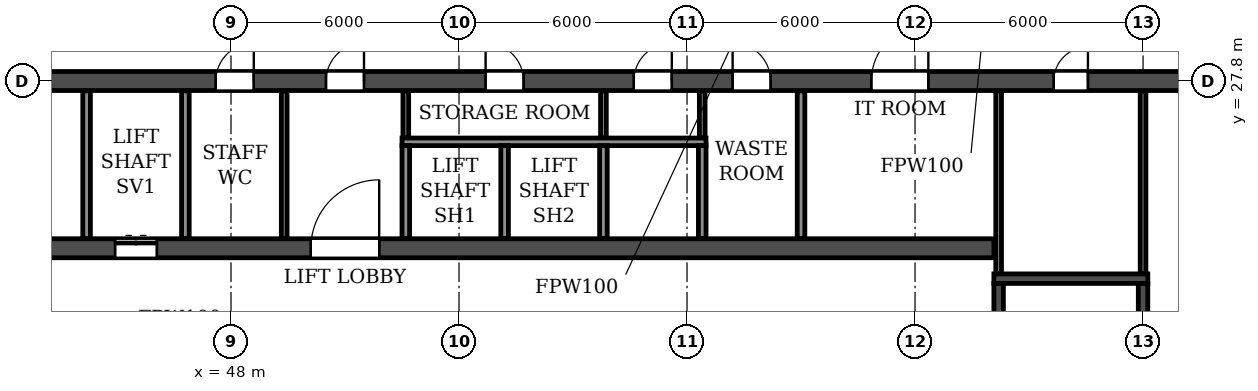
"""IFC4 building model, lengths in metres.
Left out: names, types, materials, properties, quantities, classifications, styles, units other than length and angle.
Written with IfcOpenShell. Run it as: python <this file> out.ifc"""

import sys

from ifc_helpers import new_model, si_unit, direction, frame, frame_2d, origin, place, context, subcontext, project, spatial, rectangle, extrude, element, fill, save


model = new_model("IFC4")
c1 = context("Model", 3, precision=1e-05, world=origin(), true_north=direction((0.0, 1.0)))
c2 = subcontext(c1, "Body", "Model", "MODEL_VIEW")
j1 = project(units=[si_unit("LENGTHUNIT", "METRE"), si_unit("PLANEANGLEUNIT", "RADIAN")], contexts=[c1])
p1 = place(None, origin())
s1 = spatial("IfcSite", under=j1, at=p1, CompositionType="ELEMENT")
p2 = place(p1, origin())
s2 = spatial("IfcBuilding", under=s1, at=p2, CompositionType="ELEMENT")
p3 = place(p2, frame((0.0, 0.0, 92.7)))
s3 = spatial("IfcBuildingStorey", under=s2, at=p3, CompositionType="ELEMENT", Elevation=92.7)
p4 = place(p3, frame((8.6, 27.8, 0.0), z_axis=(0.0, 0.0, 1.0), x_axis=(1.0, 0.0, 0.0)))
e1 = element("IfcWall", 1, at=p4, inside=s3, PredefinedType="SOLIDWALL", context=c2, shape_type="SweptSolid", body=[
    extrude(rectangle(XDim=84.8, YDim=0.5, at=frame_2d((42.4, 0.0))), origin(), (0.0, 0.0, 1.0), 3.06),
])
p5 = place(p4, frame((0.9, 0.0, 0.0)))
e2 = element("IfcOpeningElement", 2, at=p5, cuts=e1, PredefinedType="OPENING", context=c2, shape_type="SweptSolid", body=[
    extrude(rectangle(XDim=1.0, YDim=2.1, at=frame_2d((0.5, 1.05))), frame((0.0, 0.26, 0.0), z_axis=(0.0, -1.0, 0.0), x_axis=(1.0, 0.0, 0.0)), (0.0, 0.0, 1.0), 0.52),
])
p6 = place(p4, frame((5.6, 0.0, 0.0)))
e3 = element("IfcOpeningElement", 3, at=p6, cuts=e1, PredefinedType="OPENING", context=c2, shape_type="SweptSolid", body=[
    extrude(rectangle(XDim=1.0, YDim=2.1, at=frame_2d((0.5, 1.05))), frame((0.0, 0.26, 0.0), z_axis=(0.0, -1.0, 0.0), x_axis=(1.0, 0.0, 0.0)), (0.0, 0.0, 1.0), 0.52),
])
p7 = place(p4, frame((10.3, 0.0, 0.0)))
e4 = element("IfcOpeningElement", 4, at=p7, cuts=e1, PredefinedType="OPENING", context=c2, shape_type="SweptSolid", body=[
    extrude(rectangle(XDim=1.0, YDim=2.1, at=frame_2d((0.5, 1.05))), frame((0.0, 0.26, 0.0), z_axis=(0.0, -1.0, 0.0), x_axis=(1.0, 0.0, 0.0)), (0.0, 0.0, 1.0), 0.52),
])
p8 = place(p4, frame((13.65, 0.0, 0.0)))
e5 = element("IfcOpeningElement", 5, at=p8, cuts=e1, PredefinedType="OPENING", context=c2, shape_type="SweptSolid", body=[
    extrude(rectangle(XDim=0.9, YDim=2.1, at=frame_2d((0.45, 1.05))), frame((0.0, 0.26, 0.0), z_axis=(0.0, -1.0, 0.0), x_axis=(1.0, 0.0, 0.0)), (0.0, 0.0, 1.0), 0.52),
])
p9 = place(p4, frame((22.85, 0.0, 0.0)))
e6 = element("IfcOpeningElement", 6, at=p9, cuts=e1, PredefinedType="OPENING", context=c2, shape_type="SweptSolid", body=[
    extrude(rectangle(XDim=0.9, YDim=2.1, at=frame_2d((0.45, 1.05))), frame((0.0, 0.26, 0.0), z_axis=(0.0, -1.0, 0.0), x_axis=(1.0, 0.0, 0.0)), (0.0, 0.0, 1.0), 0.52),
])
p10 = place(p4, frame((26.0, 0.0, 0.0)))
e7 = element("IfcOpeningElement", 7, at=p10, cuts=e1, PredefinedType="OPENING", context=c2, shape_type="SweptSolid", body=[
    extrude(rectangle(XDim=1.0, YDim=2.1, at=frame_2d((0.5, 1.05))), frame((0.0, 0.26, 0.0), z_axis=(0.0, -1.0, 0.0), x_axis=(1.0, 0.0, 0.0)), (0.0, 0.0, 1.0), 0.52),
])
p11 = place(p4, frame((31.2, 0.0, 0.0)))
e8 = element("IfcOpeningElement", 8, at=p11, cuts=e1, PredefinedType="OPENING", context=c2, shape_type="SweptSolid", body=[
    extrude(rectangle(XDim=1.0, YDim=2.1, at=frame_2d((0.5, 1.05))), frame((0.0, 0.26, 0.0), z_axis=(0.0, -1.0, 0.0), x_axis=(1.0, 0.0, 0.0)), (0.0, 0.0, 1.0), 0.52),
])
p12 = place(p4, frame((39.0, 0.0, 0.0)))
e9 = element("IfcOpeningElement", 9, at=p12, cuts=e1, PredefinedType="OPENING", context=c2, shape_type="SweptSolid", body=[
    extrude(rectangle(XDim=1.0, YDim=2.1, at=frame_2d((0.5, 1.05))), frame((0.0, 0.26, 0.0), z_axis=(0.0, -1.0, 0.0), x_axis=(1.0, 0.0, 0.0)), (0.0, 0.0, 1.0), 0.52),
])
p13 = place(p4, frame((41.9, 0.0, 0.0)))
e10 = element("IfcOpeningElement", 10, at=p13, cuts=e1, PredefinedType="OPENING", context=c2, shape_type="SweptSolid", body=[
    extrude(rectangle(XDim=1.0, YDim=2.1, at=frame_2d((0.5, 1.05))), frame((0.0, 0.26, 0.0), z_axis=(0.0, -1.0, 0.0), x_axis=(1.0, 0.0, 0.0)), (0.0, 0.0, 1.0), 0.52),
])
p14 = place(p4, frame((46.1, 0.0, 0.0)))
e11 = element("IfcOpeningElement", 11, at=p14, cuts=e1, PredefinedType="OPENING", context=c2, shape_type="SweptSolid", body=[
    extrude(rectangle(XDim=1.0, YDim=2.1, at=frame_2d((0.5, 1.05))), frame((0.0, 0.26, 0.0), z_axis=(0.0, -1.0, 0.0), x_axis=(1.0, 0.0, 0.0)), (0.0, 0.0, 1.0), 0.52),
])
p15 = place(p4, frame((50.0, 0.0, 0.0)))
e12 = element("IfcOpeningElement", 12, at=p15, cuts=e1, PredefinedType="OPENING", context=c2, shape_type="SweptSolid", body=[
    extrude(rectangle(XDim=1.0, YDim=2.1, at=frame_2d((0.5, 1.05))), frame((0.0, 0.26, 0.0), z_axis=(0.0, -1.0, 0.0), x_axis=(1.0, 0.0, 0.0)), (0.0, 0.0, 1.0), 0.52),
])
p16 = place(p4, frame((52.6, 0.0, 0.0)))
e13 = element("IfcOpeningElement", 13, at=p16, cuts=e1, PredefinedType="OPENING", context=c2, shape_type="SweptSolid", body=[
    extrude(rectangle(XDim=1.0, YDim=2.1, at=frame_2d((0.5, 1.05))), frame((0.0, 0.26, 0.0), z_axis=(0.0, -1.0, 0.0), x_axis=(1.0, 0.0, 0.0)), (0.0, 0.0, 1.0), 0.52),
])
p17 = place(p4, frame((56.25, 0.0, 0.0)))
e14 = element("IfcOpeningElement", 14, at=p17, cuts=e1, PredefinedType="OPENING", context=c2, shape_type="SweptSolid", body=[
    extrude(rectangle(XDim=1.5, YDim=2.1, at=frame_2d((0.75, 1.05))), frame((0.0, 0.26, 0.0), z_axis=(0.0, -1.0, 0.0), x_axis=(1.0, 0.0, 0.0)), (0.0, 0.0, 1.0), 0.52),
])
p18 = place(p4, frame((61.05, 0.0, 0.0)))
e15 = element("IfcOpeningElement", 15, at=p18, cuts=e1, PredefinedType="OPENING", context=c2, shape_type="SweptSolid", body=[
    extrude(rectangle(XDim=0.9, YDim=2.1, at=frame_2d((0.45, 1.05))), frame((0.0, 0.26, 0.0), z_axis=(0.0, -1.0, 0.0), x_axis=(1.0, 0.0, 0.0)), (0.0, 0.0, 1.0), 0.52),
])
p19 = place(p4, frame((70.25, 0.0, 0.0)))
e16 = element("IfcOpeningElement", 16, at=p19, cuts=e1, PredefinedType="OPENING", context=c2, shape_type="SweptSolid", body=[
    extrude(rectangle(XDim=0.9, YDim=2.1, at=frame_2d((0.45, 1.05))), frame((0.0, 0.26, 0.0), z_axis=(0.0, -1.0, 0.0), x_axis=(1.0, 0.0, 0.0)), (0.0, 0.0, 1.0), 0.52),
])
p20 = place(p4, frame((73.5, 0.0, 0.0)))
e17 = element("IfcOpeningElement", 17, at=p20, cuts=e1, PredefinedType="OPENING", context=c2, shape_type="SweptSolid", body=[
    extrude(rectangle(XDim=1.0, YDim=2.1, at=frame_2d((0.5, 1.05))), frame((0.0, 0.26, 0.0), z_axis=(0.0, -1.0, 0.0), x_axis=(1.0, 0.0, 0.0)), (0.0, 0.0, 1.0), 0.52),
])
p21 = place(p4, frame((79.6, 0.0, 0.0)))
e18 = element("IfcOpeningElement", 18, at=p21, cuts=e1, PredefinedType="OPENING", context=c2, shape_type="SweptSolid", body=[
    extrude(rectangle(XDim=1.0, YDim=2.1, at=frame_2d((0.5, 1.05))), frame((0.0, 0.26, 0.0), z_axis=(0.0, -1.0, 0.0), x_axis=(1.0, 0.0, 0.0)), (0.0, 0.0, 1.0), 0.52),
])
p22 = place(p3, frame((33.925, 23.4, 0.0), z_axis=(0.0, 0.0, 1.0), x_axis=(1.0, 0.0, 0.0)))
e19 = element("IfcWall", 19, at=p22, inside=s3, PredefinedType="SOLIDWALL", context=c2, shape_type="SweptSolid", body=[
    extrude(rectangle(XDim=34.15, YDim=0.5, at=frame_2d((17.075, 0.0))), origin(), (0.0, 0.0, 1.0), 3.06),
])
p23 = place(p22, frame((16.175, 0.0, 0.0)))
e20 = element("IfcOpeningElement", 20, at=p23, cuts=e19, PredefinedType="OPENING", context=c2, shape_type="SweptSolid", body=[
    extrude(rectangle(XDim=1.8, YDim=2.1, at=frame_2d((0.9, 1.05))), frame((0.0, 0.26, 0.0), z_axis=(0.0, -1.0, 0.0), x_axis=(1.0, 0.0, 0.0)), (0.0, 0.0, 1.0), 0.52),
])
p24 = place(p22, frame((11.025, 0.0, 0.0)))
e21 = element("IfcOpeningElement", 21, at=p24, cuts=e19, PredefinedType="OPENING", context=c2, shape_type="SweptSolid", body=[
    extrude(rectangle(XDim=1.1, YDim=2.1, at=frame_2d((0.55, 1.05))), frame((0.0, 0.26, 0.0), z_axis=(0.0, -1.0, 0.0), x_axis=(1.0, 0.0, 0.0)), (0.0, 0.0, 1.0), 0.52),
])
p25 = place(p3, frame((68.2, 14.85, 0.0), z_axis=(0.0, 0.0, 1.0), x_axis=(0.0, 1.0, 0.0)))
e22 = element("IfcWall", 22, at=p25, inside=s3, PredefinedType="SOLIDWALL", context=c2, shape_type="SweptSolid", body=[
    extrude(rectangle(XDim=7.625, YDim=0.25, at=frame_2d((3.812, 0.0))), origin(), (0.0, 0.0, 1.0), 3.06),
])
p26 = place(p25, frame((0.45, 0.0, 0.0)))
e23 = element("IfcOpeningElement", 23, at=p26, cuts=e22, PredefinedType="OPENING", context=c2, shape_type="SweptSolid", body=[
    extrude(rectangle(XDim=1.0, YDim=2.1, at=frame_2d((0.5, 1.05))), frame((0.0, 0.135, 0.0), z_axis=(0.0, -1.0, 0.0), x_axis=(1.0, 0.0, 0.0)), (0.0, 0.0, 1.0), 0.27),
])
p27 = place(p3, frame((72.0, 14.85, 0.0), z_axis=(0.0, 0.0, 1.0), x_axis=(0.0, 1.0, 0.0)))
e24 = element("IfcWall", 24, at=p27, inside=s3, PredefinedType="SOLIDWALL", context=c2, shape_type="SweptSolid", body=[
    extrude(rectangle(XDim=7.625, YDim=0.25, at=frame_2d((3.812, 0.0))), origin(), (0.0, 0.0, 1.0), 3.06),
])
p28 = place(p3, frame((68.075, 22.6, 0.0), z_axis=(0.0, 0.0, 1.0), x_axis=(1.0, 0.0, 0.0)))
e25 = element("IfcWall", 25, at=p28, inside=s3, PredefinedType="SOLIDWALL", context=c2, shape_type="SweptSolid", body=[
    extrude(rectangle(XDim=4.05, YDim=0.25, at=frame_2d((2.025, 0.0))), origin(), (0.0, 0.0, 1.0), 3.06),
])
p29 = place(p3, frame((49.4, 23.66, 0.0), z_axis=(0.0, 0.0, 1.0), x_axis=(0.0, 1.0, 0.0)))
e26 = element("IfcWall", 26, at=p29, inside=s3, PredefinedType="PARTITIONING", context=c2, shape_type="SweptSolid", body=[
    extrude(rectangle(XDim=3.88, YDim=0.15, at=frame_2d((1.94, 0.0))), origin(), (0.0, 0.0, 1.0), 3.06),
])
for number, where, z_axis, x_axis in (
    (27, (52.6, 26.3, 0.0), (0.0, 0.0, 1.0), (0.0, 1.0, 0.0)),
    (28, (57.8, 26.3, 0.0), (0.0, 0.0, 1.0), (0.0, 1.0, 0.0)),
    (29, (60.4, 26.3, 0.0), (0.0, 0.0, 1.0), (0.0, 1.0, 0.0)),
):
    element("IfcWall", number, at=place(p3, frame(where, z_axis=z_axis, x_axis=x_axis)), inside=s3, PredefinedType="PARTITIONING", context=c2, shape_type="SweptSolid", body=[
        extrude(rectangle(XDim=1.24, YDim=0.15, at=frame_2d((0.62, 0.0))), origin(), (0.0, 0.0, 1.0), 3.06),
    ])
p30 = place(p3, frame((63.0, 23.66, 0.0), z_axis=(0.0, 0.0, 1.0), x_axis=(0.0, 1.0, 0.0)))
e30 = element("IfcWall", 30, at=p30, inside=s3, PredefinedType="PARTITIONING", context=c2, shape_type="SweptSolid", body=[
    extrude(rectangle(XDim=3.88, YDim=0.2, at=frame_2d((1.94, 0.0))), origin(), (0.0, 0.0, 1.0), 3.06),
])
for number, where, z_axis, x_axis in (
    (31, (68.2, 22.735, 0.0), (0.0, 0.0, 1.0), (0.0, 1.0, 0.0)),
    (32, (72.0, 22.735, 0.0), (0.0, 0.0, 1.0), (0.0, 1.0, 0.0)),
):
    element("IfcWall", number, at=place(p3, frame(where, z_axis=z_axis, x_axis=x_axis)), inside=s3, PredefinedType="PARTITIONING", context=c2, shape_type="SweptSolid", body=[
        extrude(rectangle(XDim=4.805, YDim=0.15, at=frame_2d((2.402, 0.0))), origin(), (0.0, 0.0, 1.0), 3.06),
    ])
p31 = place(p3, frame((52.5, 26.2, 0.0), z_axis=(0.0, 0.0, 1.0), x_axis=(1.0, 0.0, 0.0)))
e33 = element("IfcWall", 33, at=p31, inside=s3, PredefinedType="PARTITIONING", context=c2, shape_type="SweptSolid", body=[
    extrude(rectangle(XDim=8.0, YDim=0.2, at=frame_2d((4.0, 0.0))), origin(), (0.0, 0.0, 1.0), 3.06),
])
for number, where, z_axis, x_axis in (
    (34, (44.2, 23.66, 0.0), (0.0, 0.0, 1.0), (0.0, 1.0, 0.0)),
    (35, (46.8, 23.66, 0.0), (0.0, 0.0, 1.0), (0.0, 1.0, 0.0)),
):
    element("IfcWall", number, at=place(p3, frame(where, z_axis=z_axis, x_axis=x_axis)), inside=s3, PredefinedType="PARTITIONING", context=c2, shape_type="SweptSolid", body=[
        extrude(rectangle(XDim=3.88, YDim=0.2, at=frame_2d((1.94, 0.0))), origin(), (0.0, 0.0, 1.0), 3.06),
    ])
for number, where, z_axis, x_axis in (
    (36, (52.6, 23.66, 0.0), (0.0, 0.0, 1.0), (0.0, 1.0, 0.0)),
    (37, (55.2, 23.66, 0.0), (0.0, 0.0, 1.0), (0.0, 1.0, 0.0)),
    (38, (57.8, 23.66, 0.0), (0.0, 0.0, 1.0), (0.0, 1.0, 0.0)),
    (39, (60.4, 23.66, 0.0), (0.0, 0.0, 1.0), (0.0, 1.0, 0.0)),
):
    element("IfcWall", number, at=place(p3, frame(where, z_axis=z_axis, x_axis=x_axis)), inside=s3, PredefinedType="PARTITIONING", context=c2, shape_type="SweptSolid", body=[
        extrude(rectangle(XDim=2.44, YDim=0.2, at=frame_2d((1.22, 0.0))), origin(), (0.0, 0.0, 1.0), 3.06),
    ])
p32 = place(p12, origin())
e40 = element("IfcDoor", 40, at=p32, inside=s3, OperationType="SINGLE_SWING_RIGHT", PredefinedType="DOOR", context=c2, shape_type="SweptSolid", body=[
    extrude(rectangle(XDim=1.0, YDim=2.1, at=frame_2d((0.5, 1.05))), frame((0.0, 0.025, 0.0), z_axis=(0.0, -1.0, 0.0), x_axis=(1.0, 0.0, 0.0)), (0.0, 0.0, 1.0), 0.05),
])
fill(e9, e40)
p33 = place(p13, origin())
e41 = element("IfcDoor", 41, at=p33, inside=s3, OperationType="SINGLE_SWING_RIGHT", PredefinedType="DOOR", context=c2, shape_type="SweptSolid", body=[
    extrude(rectangle(XDim=1.0, YDim=2.1, at=frame_2d((0.5, 1.05))), frame((0.0, 0.025, 0.0), z_axis=(0.0, -1.0, 0.0), x_axis=(1.0, 0.0, 0.0)), (0.0, 0.0, 1.0), 0.05),
])
fill(e10, e41)
p34 = place(p14, origin())
e42 = element("IfcDoor", 42, at=p34, inside=s3, OperationType="SINGLE_SWING_LEFT", PredefinedType="DOOR", context=c2, shape_type="SweptSolid", body=[
    extrude(rectangle(XDim=1.0, YDim=2.1, at=frame_2d((0.5, 1.05))), frame((0.0, 0.025, 0.0), z_axis=(0.0, -1.0, 0.0), x_axis=(1.0, 0.0, 0.0)), (0.0, 0.0, 1.0), 0.05),
])
fill(e11, e42)
p35 = place(p15, origin())
e43 = element("IfcDoor", 43, at=p35, inside=s3, OperationType="SINGLE_SWING_RIGHT", PredefinedType="DOOR", context=c2, shape_type="SweptSolid", body=[
    extrude(rectangle(XDim=1.0, YDim=2.1, at=frame_2d((0.5, 1.05))), frame((0.0, 0.025, 0.0), z_axis=(0.0, -1.0, 0.0), x_axis=(1.0, 0.0, 0.0)), (0.0, 0.0, 1.0), 0.05),
])
fill(e12, e43)
p36 = place(p16, origin())
e44 = element("IfcDoor", 44, at=p36, inside=s3, OperationType="SINGLE_SWING_LEFT", PredefinedType="DOOR", context=c2, shape_type="SweptSolid", body=[
    extrude(rectangle(XDim=1.0, YDim=2.1, at=frame_2d((0.5, 1.05))), frame((0.0, 0.025, 0.0), z_axis=(0.0, -1.0, 0.0), x_axis=(1.0, 0.0, 0.0)), (0.0, 0.0, 1.0), 0.05),
])
fill(e13, e44)
p37 = place(p17, origin())
e45 = element("IfcDoor", 45, at=p37, inside=s3, OperationType="DOUBLE_DOOR_SINGLE_SWING", PredefinedType="DOOR", context=c2, shape_type="SweptSolid", body=[
    extrude(rectangle(XDim=1.5, YDim=2.1, at=frame_2d((0.75, 1.05))), frame((0.0, 0.025, 0.0), z_axis=(0.0, -1.0, 0.0), x_axis=(1.0, 0.0, 0.0)), (0.0, 0.0, 1.0), 0.05),
])
fill(e14, e45)
p38 = place(p18, origin())
e46 = element("IfcDoor", 46, at=p38, inside=s3, OperationType="SINGLE_SWING_RIGHT", PredefinedType="DOOR", context=c2, shape_type="SweptSolid", body=[
    extrude(rectangle(XDim=0.9, YDim=2.1, at=frame_2d((0.45, 1.05))), frame((0.0, 0.025, 0.0), z_axis=(0.0, -1.0, 0.0), x_axis=(1.0, 0.0, 0.0)), (0.0, 0.0, 1.0), 0.05),
])
fill(e15, e46)
p39 = place(p23, origin())
e47 = element("IfcDoor", 47, at=p39, inside=s3, OperationType="DOUBLE_DOOR_SINGLE_SWING", PredefinedType="DOOR", context=c2, shape_type="SweptSolid", body=[
    extrude(rectangle(XDim=1.8, YDim=2.1, at=frame_2d((0.9, 1.05))), frame((0.0, 0.025, 0.0), z_axis=(0.0, -1.0, 0.0), x_axis=(1.0, 0.0, 0.0)), (0.0, 0.0, 1.0), 0.05),
])
fill(e20, e47)
p40 = place(p24, origin())
e48 = element("IfcDoor", 48, at=p40, inside=s3, OperationType="DOUBLE_DOOR_SLIDING", PredefinedType="DOOR", context=c2, shape_type="SweptSolid", body=[
    extrude(rectangle(XDim=1.1, YDim=2.1, at=frame_2d((0.55, 1.05))), frame((0.0, 0.025, 0.0), z_axis=(0.0, -1.0, 0.0), x_axis=(1.0, 0.0, 0.0)), (0.0, 0.0, 1.0), 0.05),
])
fill(e21, e48)
save(model, sys.argv[1])
